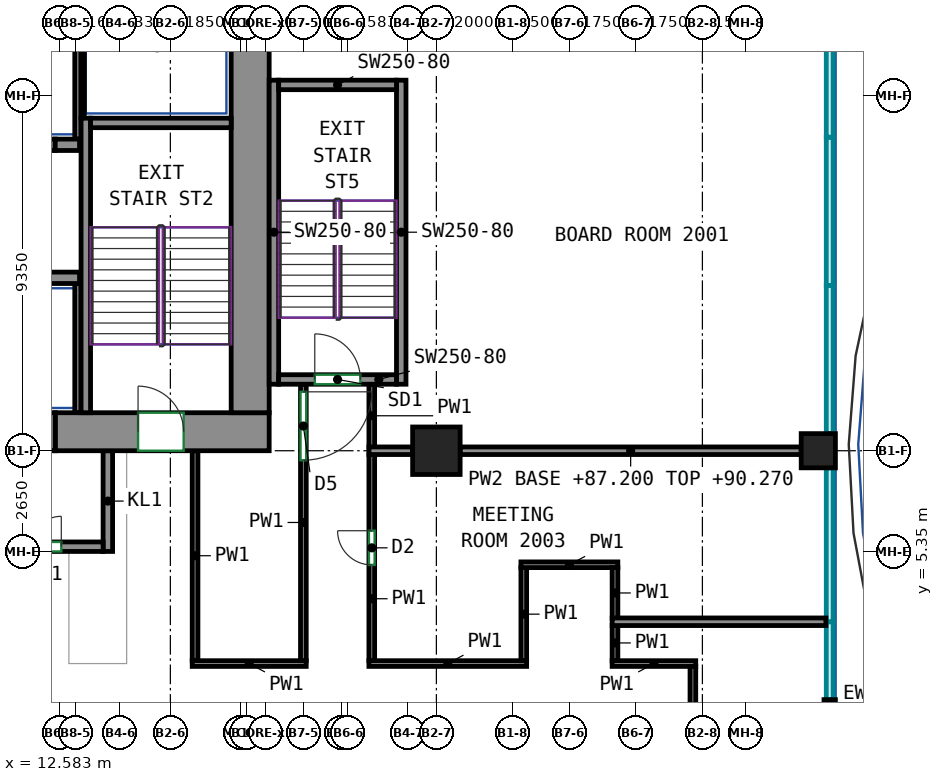
"""IFC4 building model, lengths in metres.
Left out: names, types, materials, properties, quantities, classifications, styles, units other than length and angle.
Written with IfcOpenShell. Run it as: python <this file> out.ifc"""

import sys

from ifc_helpers import new_model, si_unit, direction, frame, frame_2d, origin, origin_2d, place, context, subcontext, project, spatial, rectangle, extrude, source, transform, mapped, element, fill, save


model = new_model("IFC4")
c1 = context("Model", 3, precision=1e-05, world=origin(), true_north=direction((0.0, 1.0)))
c2 = subcontext(c1, "Body", "Model", "MODEL_VIEW")
j1 = project(units=[si_unit("LENGTHUNIT", "METRE"), si_unit("PLANEANGLEUNIT", "RADIAN")], contexts=[c1])
p1 = place(None, origin())
s1 = spatial("IfcSite", under=j1, at=p1, CompositionType="ELEMENT")
p2 = place(p1, origin())
s2 = spatial("IfcBuilding", under=s1, at=p2, CompositionType="ELEMENT")
p3 = place(p2, frame((0.0, 0.0, 87.2)))
s3 = spatial("IfcBuildingStorey", under=s2, at=p3, CompositionType="ELEMENT", Elevation=87.2)
m1 = source(origin(), c2, "Body", "SweptSolid", [
    extrude(rectangle(XDim=1.25, YDim=1.25, at=origin_2d()), origin(), (0.0, 0.0, 1.0), 3.72),
])
p4 = place(p3, frame((22.5, 8.0, 0.0), z_axis=(0.0, 0.0, 1.0), x_axis=(1.0, 0.0, 0.0)))
e1 = element("IfcColumn", 1, at=p4, inside=s3, PredefinedType="COLUMN", context=c2, shape_type="MappedRepresentation", body=[
    mapped(m1, transform((0.0, 0.0, 0.0))),
])
m2 = source(origin(), c2, "Body", "SweptSolid", [
    extrude(rectangle(XDim=0.9, YDim=0.9, at=origin_2d()), origin(), (0.0, 0.0, 1.0), 3.72),
])
p5 = place(p3, frame((32.55, 8.0, 0.0), z_axis=(0.0, 0.0, 1.0), x_axis=(1.0, 0.0, 0.0)))
e2 = element("IfcColumn", 2, at=p5, inside=s3, PredefinedType="COLUMN", context=c2, shape_type="MappedRepresentation", body=[
    mapped(m2, transform((0.0, 0.0, 0.0))),
])
m3 = source(origin(), c2, "Body", "SweptSolid", [
    extrude(rectangle(XDim=5.63, YDim=1.0, at=frame_2d((2.815, 0.0))), origin(), (0.0, 0.0, 1.0), 3.72),
])
p6 = place(p3, frame((12.47, 8.5, 0.0), z_axis=(0.0, 0.0, 1.0), x_axis=(1.0, 0.0, 0.0)))
e3 = element("IfcWall", 3, at=p6, inside=s3, PredefinedType="SHEAR", context=c2, shape_type="MappedRepresentation", body=[
    mapped(m3, transform((0.0, 0.0, 0.0))),
])
p7 = place(p6, frame((2.18, 0.0, 0.0)))
e4 = element("IfcOpeningElement", 4, at=p7, cuts=e3, PredefinedType="OPENING", context=c2, shape_type="SweptSolid", body=[
    extrude(rectangle(XDim=1.2, YDim=2.1, at=frame_2d((0.6, 1.05))), frame((0.0, 0.51, 0.0), z_axis=(0.0, -1.0, 0.0), x_axis=(1.0, 0.0, 0.0)), (0.0, 0.0, 1.0), 1.02),
])
m4 = source(origin(), c2, "Body", "SweptSolid", [
    extrude(rectangle(XDim=12.0, YDim=1.0, at=frame_2d((6.0, 0.0))), origin(), (0.0, 0.0, 1.0), 3.72),
])
p8 = place(p3, frame((17.6, 9.0, 0.0), z_axis=(0.0, 0.0, 1.0), x_axis=(0.0, 1.0, 0.0)))
e5 = element("IfcWall", 5, at=p8, inside=s3, PredefinedType="SHEAR", context=c2, shape_type="MappedRepresentation", body=[
    mapped(m4, transform((0.0, 0.0, 0.0))),
])
m5 = source(origin(), c2, "Body", "SweptSolid", [
    extrude(rectangle(XDim=7.75, YDim=0.25, at=frame_2d((3.875, 0.0))), origin(), (0.0, 0.0, 1.0), 3.72),
])
p9 = place(p3, frame((13.275, 9.0, 0.0), z_axis=(0.0, 0.0, 1.0), x_axis=(0.0, 1.0, 0.0)))
e6 = element("IfcWall", 6, at=p9, inside=s3, PredefinedType="SHEAR", context=c2, shape_type="MappedRepresentation", body=[
    mapped(m5, transform((0.0, 0.0, 0.0))),
])
m6 = source(origin(), c2, "Body", "SweptSolid", [
    extrude(rectangle(XDim=3.7, YDim=0.25, at=frame_2d((1.85, 0.0))), origin(), (0.0, 0.0, 1.0), 3.72),
])
p10 = place(p3, frame((13.4, 16.625, 0.0), z_axis=(0.0, 0.0, 1.0), x_axis=(1.0, 0.0, 0.0)))
e7 = element("IfcWall", 7, at=p10, inside=s3, PredefinedType="SHEAR", context=c2, shape_type="MappedRepresentation", body=[
    mapped(m6, transform((0.0, 0.0, 0.0))),
])
m7 = source(origin(), c2, "Body", "SweptSolid", [
    extrude(rectangle(XDim=8.0, YDim=0.25, at=frame_2d((4.0, 0.0))), origin(), (0.0, 0.0, 1.0), 3.72),
])
for number, where, z_axis, x_axis in (
    (8, (18.225, 9.75, 0.0), (0.0, 0.0, 1.0), (0.0, 1.0, 0.0)),
    (9, (21.575, 9.75, 0.0), (0.0, 0.0, 1.0), (0.0, 1.0, 0.0)),
):
    element("IfcWall", number, at=place(p3, frame(where, z_axis=z_axis, x_axis=x_axis)), inside=s3, PredefinedType="SHEAR", context=c2, shape_type="MappedRepresentation", body=[
        mapped(m7, transform((0.0, 0.0, 0.0))),
    ])
m8 = source(origin(), c2, "Body", "SweptSolid", [
    extrude(rectangle(XDim=3.1, YDim=0.25, at=frame_2d((1.55, 0.0))), origin(), (0.0, 0.0, 1.0), 3.72),
])
p11 = place(p3, frame((18.35, 9.875, 0.0), z_axis=(0.0, 0.0, 1.0), x_axis=(1.0, 0.0, 0.0)))
e10 = element("IfcWall", 10, at=p11, inside=s3, PredefinedType="SHEAR", context=c2, shape_type="MappedRepresentation", body=[
    mapped(m8, transform((0.0, 0.0, 0.0))),
])
p12 = place(p11, frame((0.95, 0.0, 0.0)))
e11 = element("IfcOpeningElement", 11, at=p12, cuts=e10, PredefinedType="OPENING", context=c2, shape_type="SweptSolid", body=[
    extrude(rectangle(XDim=1.2, YDim=2.1, at=frame_2d((0.6, 1.05))), frame((0.0, 0.135, 0.0), z_axis=(0.0, -1.0, 0.0), x_axis=(1.0, 0.0, 0.0)), (0.0, 0.0, 1.0), 0.27),
])
p13 = place(p3, frame((18.35, 17.625, 0.0), z_axis=(0.0, 0.0, 1.0), x_axis=(1.0, 0.0, 0.0)))
e12 = element("IfcWall", 12, at=p13, inside=s3, PredefinedType="SHEAR", context=c2, shape_type="MappedRepresentation", body=[
    mapped(m8, transform((0.0, 0.0, 0.0))),
])
m9 = source(origin(), c2, "Body", "SweptSolid", [
    extrude(rectangle(XDim=2.82, YDim=0.3, at=frame_2d((1.41, 0.0))), origin(), (0.0, 0.0, 1.0), 3.72),
])
p14 = place(p3, frame((10.29, 12.55, 0.0), z_axis=(0.0, 0.0, 1.0), x_axis=(1.0, 0.0, 0.0)))
e13 = element("IfcWall", 13, at=p14, inside=s3, PredefinedType="SHEAR", context=c2, shape_type="MappedRepresentation", body=[
    mapped(m9, transform((0.0, 0.0, 0.0))),
])
m10 = source(origin(), c2, "Body", "SweptSolid", [
    extrude(rectangle(XDim=0.64, YDim=0.3, at=frame_2d((0.32, 0.0))), origin(), (0.0, 0.0, 1.0), 3.72),
])
p15 = place(p3, frame((12.47, 16.05, 0.0), z_axis=(0.0, 0.0, 1.0), x_axis=(1.0, 0.0, 0.0)))
e14 = element("IfcWall", 14, at=p15, inside=s3, PredefinedType="SHEAR", context=c2, shape_type="MappedRepresentation", body=[
    mapped(m10, transform((0.0, 0.0, 0.0))),
])
m11 = source(origin(), c2, "Body", "SweptSolid", [
    extrude(rectangle(XDim=2.0, YDim=0.3, at=frame_2d((1.0, 0.0))), origin(), (0.0, 0.0, 1.0), 3.72),
])
p16 = place(p3, frame((32.85, -0.55, 0.0), z_axis=(0.0, 0.0, 1.0), x_axis=(0.0, 1.0, 0.0)))
e15 = element("IfcWall", 15, at=p16, inside=s3, PredefinedType="SOLIDWALL", context=c2, shape_type="MappedRepresentation", body=[
    mapped(m11, transform((0.0, 0.0, 0.0))),
])
p17 = place(p16, frame((0.5, 0.0, 0.0)))
e16 = element("IfcOpeningElement", 16, at=p17, cuts=e15, PredefinedType="OPENING", context=c2, shape_type="SweptSolid", body=[
    extrude(rectangle(XDim=1.0, YDim=2.1, at=frame_2d((0.5, 1.05))), frame((0.0, 0.16, 0.0), z_axis=(0.0, -1.0, 0.0), x_axis=(1.0, 0.0, 0.0)), (0.0, 0.0, 1.0), 0.32),
])
m12 = source(origin(), c2, "Body", "SweptSolid", [
    extrude(rectangle(XDim=1.4, YDim=0.3, at=frame_2d((0.7, 0.0))), origin(), (0.0, 0.0, 1.0), 3.72),
])
p18 = place(p3, frame((11.07, 16.05, 0.0), z_axis=(0.0, 0.0, 1.0), x_axis=(1.0, 0.0, 0.0)))
e17 = element("IfcWall", 17, at=p18, inside=s3, PredefinedType="PARTITIONING", context=c2, shape_type="MappedRepresentation", body=[
    mapped(m12, transform((0.0, 0.0, 0.0))),
])
p19 = place(p18, frame((0.15, 0.0, 0.0)))
e18 = element("IfcOpeningElement", 18, at=p19, cuts=e17, PredefinedType="OPENING", context=c2, shape_type="SweptSolid", body=[
    extrude(rectangle(XDim=1.1, YDim=2.1, at=frame_2d((0.55, 1.05))), frame((0.0, 0.16, 0.0), z_axis=(0.0, -1.0, 0.0), x_axis=(1.0, 0.0, 0.0)), (0.0, 0.0, 1.0), 0.32),
])
m13 = source(origin(), c2, "Body", "SweptSolid", [
    extrude(rectangle(XDim=2.65, YDim=0.25, at=frame_2d((1.325, 0.0))), origin(), (0.0, 0.0, 1.0), 3.72),
])
p20 = place(p3, frame((13.855, 5.35, 0.0), z_axis=(0.0, 0.0, 1.0), x_axis=(0.0, 1.0, 0.0)))
e19 = element("IfcWall", 19, at=p20, inside=s3, PredefinedType="PARTITIONING", context=c2, shape_type="MappedRepresentation", body=[
    mapped(m13, transform((0.0, 0.0, 0.0))),
])
m14 = source(origin(), c2, "Body", "SweptSolid", [
    extrude(rectangle(XDim=3.0, YDim=0.25, at=frame_2d((1.5, 0.0))), origin(), (0.0, 0.0, 1.0), 3.72),
])
p21 = place(p3, frame((10.73, 5.475, 0.0), z_axis=(0.0, 0.0, 1.0), x_axis=(1.0, 0.0, 0.0)))
e20 = element("IfcWall", 20, at=p21, inside=s3, PredefinedType="PARTITIONING", context=c2, shape_type="MappedRepresentation", body=[
    mapped(m14, transform((0.0, 0.0, 0.0))),
])
p22 = place(p21, frame((1.1, 0.0, 0.0)))
e21 = element("IfcOpeningElement", 21, at=p22, cuts=e20, PredefinedType="OPENING", context=c2, shape_type="SweptSolid", body=[
    extrude(rectangle(XDim=0.8, YDim=2.0, at=frame_2d((0.4, 1.0))), frame((0.0, 0.135, 0.0), z_axis=(0.0, -1.0, 0.0), x_axis=(1.0, 0.0, 0.0)), (0.0, 0.0, 1.0), 0.27),
])
m15 = source(origin(), c2, "Body", "SweptSolid", [
    extrude(rectangle(XDim=3.275, YDim=0.165, at=frame_2d((1.638, 0.0))), origin(), (0.0, 0.0, 1.0), 3.72),
])
p23 = place(p3, frame((13.067, 16.2, 0.0), z_axis=(0.0, 0.0, 1.0), x_axis=(0.0, 1.0, 0.0)))
e22 = element("IfcWall", 22, at=p23, inside=s3, PredefinedType="PARTITIONING", context=c2, shape_type="MappedRepresentation", body=[
    mapped(m15, transform((0.0, 0.0, 0.0))),
])
m16 = source(origin(), c2, "Body", "SweptSolid", [
    extrude(rectangle(XDim=2.725, YDim=0.085, at=frame_2d((1.363, 0.0))), origin(), (0.0, 0.0, 1.0), 3.72),
])
p24 = place(p3, frame((13.192, 16.75, 0.0), z_axis=(0.0, 0.0, 1.0), x_axis=(0.0, 1.0, 0.0)))
e23 = element("IfcWall", 23, at=p24, inside=s3, PredefinedType="PARTITIONING", context=c2, shape_type="MappedRepresentation", body=[
    mapped(m16, transform((0.0, 0.0, 0.0))),
])
m17 = source(origin(), c2, "Body", "SweptSolid", [
    extrude(rectangle(XDim=3.4, YDim=0.165, at=frame_2d((1.7, 0.0))), origin(), (0.0, 0.0, 1.0), 3.72),
])
p25 = place(p3, frame((13.067, 9.0, 0.0), z_axis=(0.0, 0.0, 1.0), x_axis=(0.0, 1.0, 0.0)))
e24 = element("IfcWall", 24, at=p25, inside=s3, PredefinedType="PARTITIONING", context=c2, shape_type="MappedRepresentation", body=[
    mapped(m17, transform((0.0, 0.0, 0.0))),
])
m18 = source(origin(), c2, "Body", "SweptSolid", [
    extrude(rectangle(XDim=1.4, YDim=1.0, at=frame_2d((0.7, 0.0))), origin(), (0.0, 0.0, 1.0), 2.7),
])
p26 = place(p3, frame((11.07, 8.5, 0.0), z_axis=(0.0, 0.0, 1.0), x_axis=(1.0, 0.0, 0.0)))
e25 = element("IfcWall", 25, at=p26, inside=s3, PredefinedType="PARTITIONING", context=c2, shape_type="MappedRepresentation", body=[
    mapped(m18, transform((0.0, 0.0, 0.0))),
])
p27 = place(p26, frame((0.25, 0.0, 0.0)))
e26 = element("IfcOpeningElement", 26, at=p27, cuts=e25, PredefinedType="OPENING", context=c2, shape_type="SweptSolid", body=[
    extrude(rectangle(XDim=0.9, YDim=2.1, at=frame_2d((0.45, 1.05))), frame((0.0, 0.51, 0.0), z_axis=(0.0, -1.0, 0.0), x_axis=(1.0, 0.0, 0.0)), (0.0, 0.0, 1.0), 1.02),
])
p28 = place(p3, frame((16.15, 2.475, 0.0), z_axis=(0.0, 0.0, 1.0), x_axis=(0.0, 1.0, 0.0)))
e27 = element("IfcWall", 27, at=p28, inside=s3, PredefinedType="PARTITIONING", context=c2, shape_type="SweptSolid", body=[
    extrude(rectangle(XDim=5.525, YDim=0.15, at=frame_2d((2.762, 0.0))), origin(), (0.0, 0.0, 1.0), 3.72),
])
p29 = place(p3, frame((16.075, 2.4, 0.0), z_axis=(0.0, 0.0, 1.0), x_axis=(1.0, 0.0, 0.0)))
e28 = element("IfcWall", 28, at=p29, inside=s3, PredefinedType="PARTITIONING", context=c2, shape_type="SweptSolid", body=[
    extrude(rectangle(XDim=3.0, YDim=0.15, at=frame_2d((1.5, 0.0))), origin(), (0.0, 0.0, 1.0), 3.72),
])
p30 = place(p3, frame((19.0, 9.75, 0.0), z_axis=(0.0, 0.0, 1.0), x_axis=(0.0, -1.0, 0.0)))
e29 = element("IfcWall", 29, at=p30, inside=s3, PredefinedType="PARTITIONING", context=c2, shape_type="SweptSolid", body=[
    extrude(rectangle(XDim=7.275, YDim=0.15, at=frame_2d((3.637, 0.0))), origin(), (0.0, 0.0, 1.0), 3.72),
])
p31 = place(p30, frame((0.2, 0.0, 0.0)))
e30 = element("IfcOpeningElement", 30, at=p31, cuts=e29, PredefinedType="OPENING", context=c2, shape_type="SweptSolid", body=[
    extrude(rectangle(XDim=1.8, YDim=2.1, at=frame_2d((0.9, 1.05))), frame((0.0, 0.085, 0.0), z_axis=(0.0, -1.0, 0.0), x_axis=(1.0, 0.0, 0.0)), (0.0, 0.0, 1.0), 0.17),
])
p32 = place(p3, frame((20.8, 8.09, 0.0), z_axis=(0.0, 0.0, 1.0), x_axis=(0.0, 1.0, 0.0)))
e31 = element("IfcWall", 31, at=p32, inside=s3, PredefinedType="PARTITIONING", context=c2, shape_type="SweptSolid", body=[
    extrude(rectangle(XDim=1.66, YDim=0.15, at=frame_2d((0.83, 0.0))), origin(), (0.0, 0.0, 1.0), 3.72),
])
p33 = place(p3, frame((20.8, 2.475, 0.0), z_axis=(0.0, 0.0, 1.0), x_axis=(0.0, 1.0, 0.0)))
e32 = element("IfcWall", 32, at=p33, inside=s3, PredefinedType="PARTITIONING", context=c2, shape_type="SweptSolid", body=[
    extrude(rectangle(XDim=5.435, YDim=0.15, at=frame_2d((2.717, 0.0))), origin(), (0.0, 0.0, 1.0), 3.72),
])
p34 = place(p33, frame((2.52, 0.0, 0.0)))
e33 = element("IfcOpeningElement", 33, at=p34, cuts=e32, PredefinedType="OPENING", context=c2, shape_type="SweptSolid", body=[
    extrude(rectangle(XDim=0.9, YDim=2.1, at=frame_2d((0.45, 1.05))), frame((0.0, 0.085, 0.0), z_axis=(0.0, -1.0, 0.0), x_axis=(1.0, 0.0, 0.0)), (0.0, 0.0, 1.0), 0.17),
])
p35 = place(p3, frame((20.725, 2.4, 0.0), z_axis=(0.0, 0.0, 1.0), x_axis=(1.0, 0.0, 0.0)))
e34 = element("IfcWall", 34, at=p35, inside=s3, PredefinedType="PARTITIONING", context=c2, shape_type="SweptSolid", body=[
    extrude(rectangle(XDim=4.15, YDim=0.15, at=frame_2d((2.075, 0.0))), origin(), (0.0, 0.0, 1.0), 3.72),
])
p36 = place(p3, frame((24.8, 2.475, 0.0), z_axis=(0.0, 0.0, 1.0), x_axis=(0.0, 1.0, 0.0)))
e35 = element("IfcWall", 35, at=p36, inside=s3, PredefinedType="PARTITIONING", context=c2, shape_type="SweptSolid", body=[
    extrude(rectangle(XDim=2.45, YDim=0.15, at=frame_2d((1.225, 0.0))), origin(), (0.0, 0.0, 1.0), 3.72),
])
p37 = place(p3, frame((27.275, 5.0, 0.0), z_axis=(0.0, 0.0, 1.0), x_axis=(-1.0, 0.0, 0.0)))
e36 = element("IfcWall", 36, at=p37, inside=s3, PredefinedType="PARTITIONING", context=c2, shape_type="SweptSolid", body=[
    extrude(rectangle(XDim=2.55, YDim=0.15, at=frame_2d((1.275, 0.0))), origin(), (0.0, 0.0, 1.0), 3.72),
])
p38 = place(p3, frame((27.2, 3.59, 0.0), z_axis=(0.0, 0.0, 1.0), x_axis=(0.0, 1.0, 0.0)))
e37 = element("IfcWall", 37, at=p38, inside=s3, PredefinedType="PARTITIONING", context=c2, shape_type="SweptSolid", body=[
    extrude(rectangle(XDim=1.335, YDim=0.15, at=frame_2d((0.667, 0.0))), origin(), (0.0, 0.0, 1.0), 3.72),
])
p39 = place(p3, frame((27.2, 2.475, 0.0), z_axis=(0.0, 0.0, 1.0), x_axis=(0.0, 1.0, 0.0)))
e38 = element("IfcWall", 38, at=p39, inside=s3, PredefinedType="PARTITIONING", context=c2, shape_type="SweptSolid", body=[
    extrude(rectangle(XDim=0.935, YDim=0.15, at=frame_2d((0.467, 0.0))), origin(), (0.0, 0.0, 1.0), 3.72),
])
p40 = place(p3, frame((27.125, 2.4, 0.0), z_axis=(0.0, 0.0, 1.0), x_axis=(1.0, 0.0, 0.0)))
e39 = element("IfcWall", 39, at=p40, inside=s3, PredefinedType="PARTITIONING", context=c2, shape_type="SweptSolid", body=[
    extrude(rectangle(XDim=2.2, YDim=0.15, at=frame_2d((1.1, 0.0))), origin(), (0.0, 0.0, 1.0), 3.72),
])
p41 = place(p3, frame((29.25, 0.075, 0.0), z_axis=(0.0, 0.0, 1.0), x_axis=(0.0, 1.0, 0.0)))
e40 = element("IfcWall", 40, at=p41, inside=s3, PredefinedType="PARTITIONING", context=c2, shape_type="SweptSolid", body=[
    extrude(rectangle(XDim=2.25, YDim=0.15, at=frame_2d((1.125, 0.0))), origin(), (0.0, 0.0, 1.0), 3.07),
])
p42 = place(p3, frame((23.125, 8.0, 0.0), z_axis=(0.0, 0.0, 1.0), x_axis=(1.0, 0.0, 0.0)))
e41 = element("IfcWall", 41, at=p42, inside=s3, PredefinedType="PARTITIONING", context=c2, shape_type="SweptSolid", body=[
    extrude(rectangle(XDim=8.975, YDim=0.2, at=frame_2d((4.488, 0.0))), origin(), (0.0, 0.0, 1.0), 3.07),
])
p43 = place(p3, frame((20.726, 8.0, 0.0), z_axis=(0.0, 0.0, 1.0), x_axis=(1.0, 0.0, 0.0)))
e42 = element("IfcWall", 42, at=p43, inside=s3, PredefinedType="PARTITIONING", context=c2, shape_type="SweptSolid", body=[
    extrude(rectangle(XDim=1.149, YDim=0.2, at=frame_2d((0.574, 0.0))), origin(), (0.0, 0.0, 1.0), 3.72),
])
p44 = place(p3, frame((27.126, 3.5, 0.0), z_axis=(0.0, 0.0, 1.0), x_axis=(1.0, 0.0, 0.0)))
e43 = element("IfcWall", 43, at=p44, inside=s3, PredefinedType="PARTITIONING", context=c2, shape_type="SweptSolid", body=[
    extrude(rectangle(XDim=5.624, YDim=0.2, at=frame_2d((2.812, 0.0))), origin(), (0.0, 0.0, 1.0), 3.72),
])
p45 = place(p22, origin())
e44 = element("IfcDoor", 44, at=p45, inside=s3, OperationType="SINGLE_SWING_RIGHT", PredefinedType="DOOR", context=c2, shape_type="SweptSolid", body=[
    extrude(rectangle(XDim=0.8, YDim=2.0, at=frame_2d((0.4, 1.0))), frame((0.0, 0.025, 0.0), z_axis=(0.0, -1.0, 0.0), x_axis=(1.0, 0.0, 0.0)), (0.0, 0.0, 1.0), 0.05),
])
fill(e21, e44)
p46 = place(p7, origin())
e45 = element("IfcDoor", 45, at=p46, inside=s3, OperationType="DOUBLE_DOOR_SINGLE_SWING", PredefinedType="DOOR", context=c2, shape_type="SweptSolid", body=[
    extrude(rectangle(XDim=1.2, YDim=2.1, at=frame_2d((0.6, 1.05))), frame((0.0, 0.405, 0.0), z_axis=(0.0, -1.0, 0.0), x_axis=(1.0, 0.0, 0.0)), (0.0, 0.0, 1.0), 0.05),
])
fill(e4, e45)
p47 = place(p12, origin())
e46 = element("IfcDoor", 46, at=p47, inside=s3, OperationType="DOUBLE_DOOR_SINGLE_SWING", PredefinedType="DOOR", context=c2, shape_type="SweptSolid", body=[
    extrude(rectangle(XDim=1.2, YDim=2.1, at=frame_2d((0.6, 1.05))), frame((0.0, 0.025, 0.0), z_axis=(0.0, -1.0, 0.0), x_axis=(1.0, 0.0, 0.0)), (0.0, 0.0, 1.0), 0.05),
])
fill(e11, e46)
p48 = place(p34, origin())
e47 = element("IfcDoor", 47, at=p48, inside=s3, OperationType="SINGLE_SWING_RIGHT", PredefinedType="DOOR", context=c2, shape_type="SweptSolid", body=[
    extrude(rectangle(XDim=0.9, YDim=2.1, at=frame_2d((0.45, 1.05))), frame((0.0, 0.025, 0.0), z_axis=(0.0, -1.0, 0.0), x_axis=(1.0, 0.0, 0.0)), (0.0, 0.0, 1.0), 0.05),
])
fill(e33, e47)
p49 = place(p31, origin())
e48 = element("IfcDoor", 48, at=p49, inside=s3, OperationType="DOUBLE_DOOR_SINGLE_SWING", PredefinedType="DOOR", context=c2, shape_type="SweptSolid", body=[
    extrude(rectangle(XDim=1.8, YDim=2.1, at=frame_2d((0.9, 1.05))), frame((0.0, 0.025, 0.0), z_axis=(0.0, -1.0, 0.0), x_axis=(1.0, 0.0, 0.0)), (0.0, 0.0, 1.0), 0.05),
])
fill(e30, e48)
save(model, sys.argv[1])
